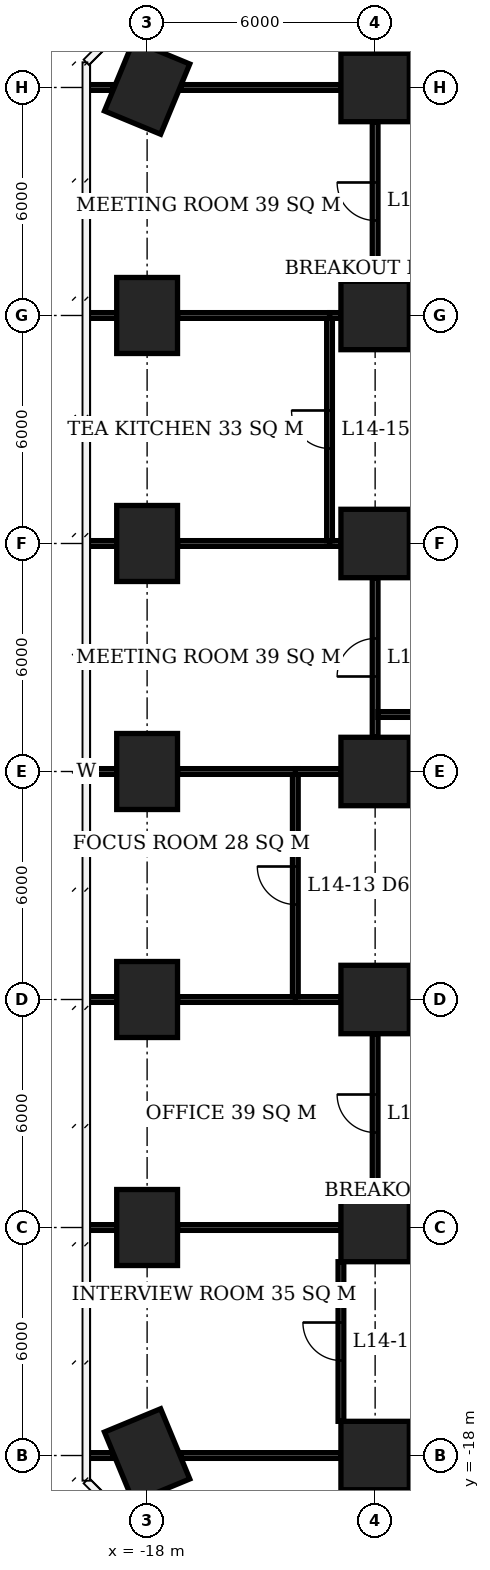
"""IFC4 building model, lengths in metres.
Left out: names, types, materials, properties, quantities, classifications, styles, units other than length and angle.
Written with IfcOpenShell. Run it as: python <this file> out.ifc"""

import sys

from ifc_helpers import new_model, si_unit, direction, frame, frame_2d, origin, origin_2d, place, context, subcontext, project, spatial, rectangle, extrude, element, fill, save


model = new_model("IFC4")
c1 = context("Model", 3, precision=1e-05, world=origin(), true_north=direction((0.0, 1.0)))
c2 = subcontext(c1, "Body", "Model", "MODEL_VIEW")
j1 = project(units=[si_unit("LENGTHUNIT", "METRE"), si_unit("PLANEANGLEUNIT", "RADIAN")], contexts=[c1])
p1 = place(None, origin())
s1 = spatial("IfcSite", under=j1, at=p1, CompositionType="ELEMENT")
p2 = place(p1, origin())
s2 = spatial("IfcBuilding", under=s1, at=p2, CompositionType="ELEMENT")
p3 = place(p2, frame((0.0, 0.0, 61.1)))
s3 = spatial("IfcBuildingStorey", under=s2, at=p3, CompositionType="ELEMENT", Elevation=61.1)
for number, where, z_axis, x_axis in (
    (1, (-18.0, -18.0, 0.0), (0.0, 0.0, 1.0), (-0.383, 0.924, 0.0)),
    (2, (-18.0, -12.0, 0.0), (0.0, 0.0, 1.0), (0.0, 1.0, 0.0)),
    (3, (-18.0, -6.0, 0.0), (0.0, 0.0, 1.0), (0.0, 1.0, 0.0)),
    (4, (-18.0, 0.0, 0.0), (0.0, 0.0, 1.0), (0.0, 1.0, 0.0)),
    (5, (-18.0, 6.0, 0.0), (0.0, 0.0, 1.0), (0.0, 1.0, 0.0)),
    (6, (-18.0, 12.0, 0.0), (0.0, 0.0, 1.0), (0.0, 1.0, 0.0)),
    (7, (-18.0, 18.0, 0.0), (0.0, 0.0, 1.0), (0.383, 0.924, 0.0)),
):
    element("IfcColumn", number, at=place(p3, frame(where, z_axis=z_axis, x_axis=x_axis)), inside=s3, PredefinedType="COLUMN", context=c2, shape_type="SweptSolid", body=[
        extrude(rectangle(XDim=2.0, YDim=1.6, at=origin_2d()), origin(), (0.0, 0.0, 1.0), 3.9),
    ])
for number, where, z_axis, x_axis in (
    (8, (-12.0, -18.0, 0.0), (0.0, 0.0, 1.0), (1.0, 0.0, 0.0)),
    (9, (-12.0, -12.0, 0.0), (0.0, 0.0, 1.0), (1.0, 0.0, 0.0)),
    (10, (-12.0, -6.0, 0.0), (0.0, 0.0, 1.0), (1.0, 0.0, 0.0)),
    (11, (-12.0, 0.0, 0.0), (0.0, 0.0, 1.0), (1.0, 0.0, 0.0)),
    (12, (-12.0, 6.0, 0.0), (0.0, 0.0, 1.0), (1.0, 0.0, 0.0)),
    (13, (-12.0, 12.0, 0.0), (0.0, 0.0, 1.0), (1.0, 0.0, 0.0)),
    (14, (-12.0, 18.0, 0.0), (0.0, 0.0, 1.0), (1.0, 0.0, 0.0)),
):
    element("IfcColumn", number, at=place(p3, frame(where, z_axis=z_axis, x_axis=x_axis)), inside=s3, PredefinedType="COLUMN", context=c2, shape_type="SweptSolid", body=[
        extrude(rectangle(XDim=1.8, YDim=1.8, at=origin_2d()), origin(), (0.0, 0.0, 1.0), 3.9),
    ])
p4 = place(p3, frame((-19.6, -18.0, 0.0), z_axis=(0.0, 0.0, 1.0), x_axis=(1.0, 0.0, 0.0)))
e15 = element("IfcWall", 15, at=p4, inside=s3, PredefinedType="PARTITIONING", context=c2, shape_type="SweptSolid", body=[
    extrude(rectangle(XDim=0.703, YDim=0.15, at=frame_2d((0.352, 0.0))), origin(), (0.0, 0.0, 1.0), 3.65),
])
p5 = place(p3, frame((-17.103, -18.0, 0.0), z_axis=(0.0, 0.0, 1.0), x_axis=(1.0, 0.0, 0.0)))
e16 = element("IfcWall", 16, at=p5, inside=s3, PredefinedType="PARTITIONING", context=c2, shape_type="SweptSolid", body=[
    extrude(rectangle(XDim=4.203, YDim=0.15, at=frame_2d((2.102, 0.0))), origin(), (0.0, 0.0, 1.0), 3.65),
])
p6 = place(p3, frame((-19.6, -12.0, 0.0), z_axis=(0.0, 0.0, 1.0), x_axis=(1.0, 0.0, 0.0)))
e17 = element("IfcWall", 17, at=p6, inside=s3, PredefinedType="PARTITIONING", context=c2, shape_type="SweptSolid", body=[
    extrude(rectangle(XDim=0.8, YDim=0.15, at=frame_2d((0.4, 0.0))), origin(), (0.0, 0.0, 1.0), 3.65),
])
p7 = place(p3, frame((-17.2, -12.0, 0.0), z_axis=(0.0, 0.0, 1.0), x_axis=(1.0, 0.0, 0.0)))
e18 = element("IfcWall", 18, at=p7, inside=s3, PredefinedType="PARTITIONING", context=c2, shape_type="SweptSolid", body=[
    extrude(rectangle(XDim=4.3, YDim=0.15, at=frame_2d((2.15, 0.0))), origin(), (0.0, 0.0, 1.0), 3.65),
])
p8 = place(p3, frame((-19.6, -6.0, 0.0), z_axis=(0.0, 0.0, 1.0), x_axis=(1.0, 0.0, 0.0)))
e19 = element("IfcWall", 19, at=p8, inside=s3, PredefinedType="PARTITIONING", context=c2, shape_type="SweptSolid", body=[
    extrude(rectangle(XDim=0.8, YDim=0.15, at=frame_2d((0.4, 0.0))), origin(), (0.0, 0.0, 1.0), 3.65),
])
p9 = place(p3, frame((-17.2, -6.0, 0.0), z_axis=(0.0, 0.0, 1.0), x_axis=(1.0, 0.0, 0.0)))
e20 = element("IfcWall", 20, at=p9, inside=s3, PredefinedType="PARTITIONING", context=c2, shape_type="SweptSolid", body=[
    extrude(rectangle(XDim=3.175, YDim=0.15, at=frame_2d((1.587, 0.0))), origin(), (0.0, 0.0, 1.0), 3.65),
])
p10 = place(p3, frame((-14.1, -6.0, 0.0), z_axis=(0.0, 0.0, 1.0), x_axis=(1.0, 0.0, 0.0)))
e21 = element("IfcWall", 21, at=p10, inside=s3, PredefinedType="PARTITIONING", context=c2, shape_type="SweptSolid", body=[
    extrude(rectangle(XDim=1.2, YDim=0.15, at=frame_2d((0.6, 0.0))), origin(), (0.0, 0.0, 1.0), 3.65),
])
p11 = place(p3, frame((-19.55, 0.0, 0.0), z_axis=(0.0, 0.0, 1.0), x_axis=(1.0, 0.0, 0.0)))
e22 = element("IfcWall", 22, at=p11, inside=s3, PredefinedType="PARTITIONING", context=c2, shape_type="SweptSolid", body=[
    extrude(rectangle(XDim=0.75, YDim=0.15, at=frame_2d((0.375, 0.0))), origin(), (0.0, 0.0, 1.0), 3.65),
])
p12 = place(p3, frame((-17.2, 0.0, 0.0), z_axis=(0.0, 0.0, 1.0), x_axis=(1.0, 0.0, 0.0)))
e23 = element("IfcWall", 23, at=p12, inside=s3, PredefinedType="PARTITIONING", context=c2, shape_type="SweptSolid", body=[
    extrude(rectangle(XDim=3.175, YDim=0.15, at=frame_2d((1.587, 0.0))), origin(), (0.0, 0.0, 1.0), 3.65),
])
p13 = place(p3, frame((-14.1, 0.0, 0.0), z_axis=(0.0, 0.0, 1.0), x_axis=(1.0, 0.0, 0.0)))
e24 = element("IfcWall", 24, at=p13, inside=s3, PredefinedType="PARTITIONING", context=c2, shape_type="SweptSolid", body=[
    extrude(rectangle(XDim=1.2, YDim=0.15, at=frame_2d((0.6, 0.0))), origin(), (0.0, 0.0, 1.0), 3.65),
])
p14 = place(p3, frame((-19.6, 6.0, 0.0), z_axis=(0.0, 0.0, 1.0), x_axis=(1.0, 0.0, 0.0)))
e25 = element("IfcWall", 25, at=p14, inside=s3, PredefinedType="PARTITIONING", context=c2, shape_type="SweptSolid", body=[
    extrude(rectangle(XDim=0.8, YDim=0.15, at=frame_2d((0.4, 0.0))), origin(), (0.0, 0.0, 1.0), 3.65),
])
p15 = place(p3, frame((-17.2, 6.0, 0.0), z_axis=(0.0, 0.0, 1.0), x_axis=(1.0, 0.0, 0.0)))
e26 = element("IfcWall", 26, at=p15, inside=s3, PredefinedType="PARTITIONING", context=c2, shape_type="SweptSolid", body=[
    extrude(rectangle(XDim=4.075, YDim=0.15, at=frame_2d((2.038, 0.0))), origin(), (0.0, 0.0, 1.0), 3.65),
])
p16 = place(p3, frame((-13.2, 6.0, 0.0), z_axis=(0.0, 0.0, 1.0), x_axis=(1.0, 0.0, 0.0)))
e27 = element("IfcWall", 27, at=p16, inside=s3, PredefinedType="PARTITIONING", context=c2, shape_type="SweptSolid", body=[
    extrude(rectangle(XDim=0.3, YDim=0.15, at=frame_2d((0.15, 0.0))), origin(), (0.0, 0.0, 1.0), 3.65),
])
p17 = place(p3, frame((-19.6, 12.0, 0.0), z_axis=(0.0, 0.0, 1.0), x_axis=(1.0, 0.0, 0.0)))
e28 = element("IfcWall", 28, at=p17, inside=s3, PredefinedType="PARTITIONING", context=c2, shape_type="SweptSolid", body=[
    extrude(rectangle(XDim=0.8, YDim=0.15, at=frame_2d((0.4, 0.0))), origin(), (0.0, 0.0, 1.0), 3.65),
])
p18 = place(p3, frame((-17.2, 12.0, 0.0), z_axis=(0.0, 0.0, 1.0), x_axis=(1.0, 0.0, 0.0)))
e29 = element("IfcWall", 29, at=p18, inside=s3, PredefinedType="PARTITIONING", context=c2, shape_type="SweptSolid", body=[
    extrude(rectangle(XDim=4.075, YDim=0.15, at=frame_2d((2.038, 0.0))), origin(), (0.0, 0.0, 1.0), 3.65),
])
p19 = place(p3, frame((-13.2, 12.0, 0.0), z_axis=(0.0, 0.0, 1.0), x_axis=(1.0, 0.0, 0.0)))
e30 = element("IfcWall", 30, at=p19, inside=s3, PredefinedType="PARTITIONING", context=c2, shape_type="SweptSolid", body=[
    extrude(rectangle(XDim=0.3, YDim=0.15, at=frame_2d((0.15, 0.0))), origin(), (0.0, 0.0, 1.0), 3.65),
])
p20 = place(p3, frame((-19.6, 18.0, 0.0), z_axis=(0.0, 0.0, 1.0), x_axis=(1.0, 0.0, 0.0)))
e31 = element("IfcWall", 31, at=p20, inside=s3, PredefinedType="PARTITIONING", context=c2, shape_type="SweptSolid", body=[
    extrude(rectangle(XDim=0.703, YDim=0.15, at=frame_2d((0.352, 0.0))), origin(), (0.0, 0.0, 1.0), 3.65),
])
p21 = place(p3, frame((-17.103, 18.0, 0.0), z_axis=(0.0, 0.0, 1.0), x_axis=(1.0, 0.0, 0.0)))
e32 = element("IfcWall", 32, at=p21, inside=s3, PredefinedType="PARTITIONING", context=c2, shape_type="SweptSolid", body=[
    extrude(rectangle(XDim=4.203, YDim=0.15, at=frame_2d((2.102, 0.0))), origin(), (0.0, 0.0, 1.0), 3.65),
])
p22 = place(p3, frame((-14.1, -5.925, 0.0), z_axis=(0.0, 0.0, 1.0), x_axis=(0.0, 1.0, 0.0)))
e33 = element("IfcWall", 33, at=p22, inside=s3, PredefinedType="PARTITIONING", context=c2, shape_type="SweptSolid", body=[
    extrude(rectangle(XDim=5.85, YDim=0.15, at=frame_2d((2.925, 0.0))), origin(), (0.0, 0.0, 1.0), 3.65),
])
p23 = place(p22, frame((2.425, 0.0, 0.0)))
e34 = element("IfcOpeningElement", 34, at=p23, cuts=e33, PredefinedType="OPENING", context=c2, shape_type="SweptSolid", body=[
    extrude(rectangle(XDim=1.0, YDim=2.1, at=frame_2d((0.5, 1.05))), frame((0.0, 0.085, 0.0), z_axis=(0.0, -1.0, 0.0), x_axis=(1.0, 0.0, 0.0)), (0.0, 0.0, 1.0), 0.17),
])
p24 = place(p3, frame((-13.2, 6.075, 0.0), z_axis=(0.0, 0.0, 1.0), x_axis=(0.0, 1.0, 0.0)))
e35 = element("IfcWall", 35, at=p24, inside=s3, PredefinedType="PARTITIONING", context=c2, shape_type="SweptSolid", body=[
    extrude(rectangle(XDim=5.85, YDim=0.15, at=frame_2d((2.925, 0.0))), origin(), (0.0, 0.0, 1.0), 3.65),
])
p25 = place(p24, frame((2.425, 0.0, 0.0)))
e36 = element("IfcOpeningElement", 36, at=p25, cuts=e35, PredefinedType="OPENING", context=c2, shape_type="SweptSolid", body=[
    extrude(rectangle(XDim=1.0, YDim=2.1, at=frame_2d((0.5, 1.05))), frame((0.0, 0.085, 0.0), z_axis=(0.0, -1.0, 0.0), x_axis=(1.0, 0.0, 0.0)), (0.0, 0.0, 1.0), 0.17),
])
p26 = place(p3, frame((-12.9, -17.1, 0.0), z_axis=(0.0, 0.0, 1.0), x_axis=(0.0, 1.0, 0.0)))
e37 = element("IfcWall", 37, at=p26, inside=s3, PredefinedType="PARTITIONING", context=c2, shape_type="SweptSolid", body=[
    extrude(rectangle(XDim=4.2, YDim=0.15, at=frame_2d((2.1, 0.0))), origin(), (0.0, 0.0, 1.0), 3.65),
])
p27 = place(p26, frame((1.6, 0.0, 0.0)))
e38 = element("IfcOpeningElement", 38, at=p27, cuts=e37, PredefinedType="OPENING", context=c2, shape_type="SweptSolid", body=[
    extrude(rectangle(XDim=1.0, YDim=2.1, at=frame_2d((0.5, 1.05))), frame((0.0, 0.085, 0.0), z_axis=(0.0, -1.0, 0.0), x_axis=(1.0, 0.0, 0.0)), (0.0, 0.0, 1.0), 0.17),
])
p28 = place(p3, frame((-12.0, -11.1, 0.0), z_axis=(0.0, 0.0, 1.0), x_axis=(0.0, 1.0, 0.0)))
e39 = element("IfcWall", 39, at=p28, inside=s3, PredefinedType="PARTITIONING", context=c2, shape_type="SweptSolid", body=[
    extrude(rectangle(XDim=4.2, YDim=0.15, at=frame_2d((2.1, 0.0))), origin(), (0.0, 0.0, 1.0), 3.65),
])
p29 = place(p28, frame((1.6, 0.0, 0.0)))
e40 = element("IfcOpeningElement", 40, at=p29, cuts=e39, PredefinedType="OPENING", context=c2, shape_type="SweptSolid", body=[
    extrude(rectangle(XDim=1.0, YDim=2.1, at=frame_2d((0.5, 1.05))), frame((0.0, 0.085, 0.0), z_axis=(0.0, -1.0, 0.0), x_axis=(1.0, 0.0, 0.0)), (0.0, 0.0, 1.0), 0.17),
])
p30 = place(p3, frame((-12.0, 0.9, 0.0), z_axis=(0.0, 0.0, 1.0), x_axis=(0.0, 1.0, 0.0)))
e41 = element("IfcWall", 41, at=p30, inside=s3, PredefinedType="PARTITIONING", context=c2, shape_type="SweptSolid", body=[
    extrude(rectangle(XDim=4.2, YDim=0.15, at=frame_2d((2.1, 0.0))), origin(), (0.0, 0.0, 1.0), 3.65),
])
p31 = place(p30, frame((1.6, 0.0, 0.0)))
e42 = element("IfcOpeningElement", 42, at=p31, cuts=e41, PredefinedType="OPENING", context=c2, shape_type="SweptSolid", body=[
    extrude(rectangle(XDim=1.0, YDim=2.1, at=frame_2d((0.5, 1.05))), frame((0.0, 0.085, 0.0), z_axis=(0.0, -1.0, 0.0), x_axis=(1.0, 0.0, 0.0)), (0.0, 0.0, 1.0), 0.17),
])
p32 = place(p3, frame((-12.0, 12.9, 0.0), z_axis=(0.0, 0.0, 1.0), x_axis=(0.0, 1.0, 0.0)))
e43 = element("IfcWall", 43, at=p32, inside=s3, PredefinedType="PARTITIONING", context=c2, shape_type="SweptSolid", body=[
    extrude(rectangle(XDim=4.2, YDim=0.15, at=frame_2d((2.1, 0.0))), origin(), (0.0, 0.0, 1.0), 3.65),
])
p33 = place(p32, frame((1.6, 0.0, 0.0)))
e44 = element("IfcOpeningElement", 44, at=p33, cuts=e43, PredefinedType="OPENING", context=c2, shape_type="SweptSolid", body=[
    extrude(rectangle(XDim=1.0, YDim=2.1, at=frame_2d((0.5, 1.05))), frame((0.0, 0.085, 0.0), z_axis=(0.0, -1.0, 0.0), x_axis=(1.0, 0.0, 0.0)), (0.0, 0.0, 1.0), 0.17),
])
p34 = place(p3, frame((-11.925, 1.5, 0.0), z_axis=(0.0, 0.0, 1.0), x_axis=(1.0, 0.0, 0.0)))
e45 = element("IfcWall", 45, at=p34, inside=s3, PredefinedType="PARTITIONING", context=c2, shape_type="SweptSolid", body=[
    extrude(rectangle(XDim=3.575, YDim=0.15, at=frame_2d((1.788, 0.0))), origin(), (0.0, 0.0, 1.0), 3.65),
])
p35 = place(p27, origin())
e46 = element("IfcDoor", 46, at=p35, inside=s3, OperationType="SINGLE_SWING_RIGHT", PredefinedType="DOOR", context=c2, shape_type="SweptSolid", body=[
    extrude(rectangle(XDim=1.0, YDim=2.1, at=frame_2d((0.5, 1.05))), frame((0.0, 0.025, 0.0), z_axis=(0.0, -1.0, 0.0), x_axis=(1.0, 0.0, 0.0)), (0.0, 0.0, 1.0), 0.05),
])
fill(e38, e46)
p36 = place(p29, origin())
e47 = element("IfcDoor", 47, at=p36, inside=s3, OperationType="SINGLE_SWING_RIGHT", PredefinedType="DOOR", context=c2, shape_type="SweptSolid", body=[
    extrude(rectangle(XDim=1.0, YDim=2.1, at=frame_2d((0.5, 1.05))), frame((0.0, 0.025, 0.0), z_axis=(0.0, -1.0, 0.0), x_axis=(1.0, 0.0, 0.0)), (0.0, 0.0, 1.0), 0.05),
])
fill(e40, e47)
p37 = place(p23, origin())
e48 = element("IfcDoor", 48, at=p37, inside=s3, OperationType="SINGLE_SWING_RIGHT", PredefinedType="DOOR", context=c2, shape_type="SweptSolid", body=[
    extrude(rectangle(XDim=1.0, YDim=2.1, at=frame_2d((0.5, 1.05))), frame((0.0, 0.025, 0.0), z_axis=(0.0, -1.0, 0.0), x_axis=(1.0, 0.0, 0.0)), (0.0, 0.0, 1.0), 0.05),
])
fill(e34, e48)
p38 = place(p31, origin())
e49 = element("IfcDoor", 49, at=p38, inside=s3, OperationType="SINGLE_SWING_LEFT", PredefinedType="DOOR", context=c2, shape_type="SweptSolid", body=[
    extrude(rectangle(XDim=1.0, YDim=2.1, at=frame_2d((0.5, 1.05))), frame((0.0, 0.025, 0.0), z_axis=(0.0, -1.0, 0.0), x_axis=(1.0, 0.0, 0.0)), (0.0, 0.0, 1.0), 0.05),
])
fill(e42, e49)
p39 = place(p25, origin())
e50 = element("IfcDoor", 50, at=p39, inside=s3, OperationType="SINGLE_SWING_RIGHT", PredefinedType="DOOR", context=c2, shape_type="SweptSolid", body=[
    extrude(rectangle(XDim=1.0, YDim=2.1, at=frame_2d((0.5, 1.05))), frame((0.0, 0.025, 0.0), z_axis=(0.0, -1.0, 0.0), x_axis=(1.0, 0.0, 0.0)), (0.0, 0.0, 1.0), 0.05),
])
fill(e36, e50)
p40 = place(p33, origin())
e51 = element("IfcDoor", 51, at=p40, inside=s3, OperationType="SINGLE_SWING_RIGHT", PredefinedType="DOOR", context=c2, shape_type="SweptSolid", body=[
    extrude(rectangle(XDim=1.0, YDim=2.1, at=frame_2d((0.5, 1.05))), frame((0.0, 0.025, 0.0), z_axis=(0.0, -1.0, 0.0), x_axis=(1.0, 0.0, 0.0)), (0.0, 0.0, 1.0), 0.05),
])
fill(e44, e51)
save(model, sys.argv[1])
